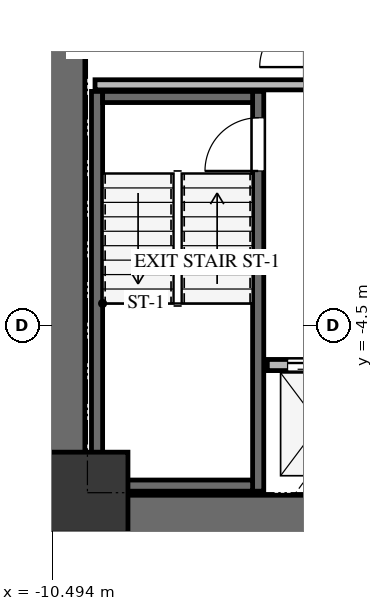
"""IFC4 building model, lengths in metres.
Left out: names, types, materials, properties, quantities, classifications, styles, units other than length and angle.
Written with IfcOpenShell. Run it as: python <this file> out.ifc"""

import sys

from ifc_helpers import new_model, si_unit, direction, frame, frame_2d, origin, origin_2d, place, context, subcontext, project, spatial, rectangle, extrude, source, transform, mapped, element, fill, save


model = new_model("IFC4")
c1 = context("Model", 3, precision=1e-05, world=origin(), true_north=direction((0.0, 1.0)))
c2 = subcontext(c1, "Body", "Model", "MODEL_VIEW")
j1 = project(units=[si_unit("LENGTHUNIT", "METRE"), si_unit("PLANEANGLEUNIT", "RADIAN")], contexts=[c1])
p1 = place(None, origin())
s1 = spatial("IfcSite", under=j1, at=p1, CompositionType="ELEMENT")
p2 = place(p1, origin())
s2 = spatial("IfcBuilding", under=s1, at=p2, CompositionType="ELEMENT")
p3 = place(p2, frame((0.0, 0.0, 32.4)))
s3 = spatial("IfcBuildingStorey", under=s2, at=p3, CompositionType="ELEMENT", Elevation=32.4)
p4 = place(p3, frame((-10.3, -8.75, 0.0), z_axis=(0.0, 0.0, 1.0), x_axis=(0.0, 1.0, 0.0)))
e1 = element("IfcWall", 1, at=p4, inside=s3, PredefinedType="SHEAR", context=c2, shape_type="SweptSolid", body=[
    extrude(rectangle(XDim=17.5, YDim=0.9, at=frame_2d((8.75, 0.0))), origin(), (0.0, 0.0, 1.0), 3.3),
])
p5 = place(p3, frame((-9.85, -8.3, 0.0), z_axis=(0.0, 0.0, 1.0), x_axis=(1.0, 0.0, 0.0)))
e2 = element("IfcWall", 2, at=p5, inside=s3, PredefinedType="SHEAR", context=c2, shape_type="SweptSolid", body=[
    extrude(rectangle(XDim=7.75, YDim=0.9, at=frame_2d((3.875, 0.0))), origin(), (0.0, 0.0, 1.0), 3.3),
])
p6 = place(p3, frame((-6.43, -7.77, -0.24), z_axis=(0.0, 0.0, 1.0), x_axis=(0.0, 1.0, 0.0)))
e3 = element("IfcWall", 3, at=p6, inside=s3, PredefinedType="SHEAR", context=c2, shape_type="SweptSolid", body=[
    extrude(rectangle(XDim=7.89, YDim=0.22, at=frame_2d((3.945, 0.0))), origin(), (0.0, 0.0, 1.0), 3.3),
])
p7 = place(p6, frame((6.32, 0.0, 0.0)))
e4 = element("IfcOpeningElement", 4, at=p7, cuts=e3, PredefinedType="OPENING", context=c2, shape_type="SweptSolid", body=[
    extrude(rectangle(XDim=1.05, YDim=2.15, at=frame_2d((0.525, 1.075))), frame((0.0, 0.12, 0.0), z_axis=(0.0, -1.0, 0.0), x_axis=(1.0, 0.0, 0.0)), (0.0, 0.0, 1.0), 0.24),
])
p8 = place(p3, frame((-9.61, 0.12, -0.24), z_axis=(0.0, 0.0, 1.0), x_axis=(0.0, -1.0, 0.0)))
e5 = element("IfcWall", 5, at=p8, inside=s3, PredefinedType="SHEAR", context=c2, shape_type="SweptSolid", body=[
    extrude(rectangle(XDim=7.89, YDim=0.22, at=frame_2d((3.945, 0.0))), origin(), (0.0, 0.0, 1.0), 3.3),
])
for number, where, z_axis, x_axis in (
    (6, (-9.5, -7.66, -0.24), (0.0, 0.0, 1.0), (1.0, 0.0, 0.0)),
    (7, (-6.54, 0.01, -0.24), (0.0, 0.0, 1.0), (-1.0, 0.0, 0.0)),
):
    element("IfcWall", number, at=place(p3, frame(where, z_axis=z_axis, x_axis=x_axis)), inside=s3, PredefinedType="SHEAR", context=c2, shape_type="SweptSolid", body=[
        extrude(rectangle(XDim=2.96, YDim=0.22, at=frame_2d((1.48, 0.0))), origin(), (0.0, 0.0, 1.0), 3.3),
    ])
m1 = source(origin(), c2, "Body", "SweptSolid", [
    extrude(rectangle(XDim=1.6, YDim=1.6, at=origin_2d()), origin(), (0.0, 0.0, 1.0), 3.3),
])
p9 = place(p3, frame((-9.8, -7.8, -0.24), z_axis=(0.0, 0.0, 1.0), x_axis=(1.0, 0.0, 0.0)))
e8 = element("IfcColumn", 8, at=p9, inside=s3, PredefinedType="COLUMN", context=c2, shape_type="MappedRepresentation", body=[
    mapped(m1, transform((0.0, 0.0, 0.0), x_axis=(1.0, 0.0, 0.0), y_axis=(0.0, 1.0, 0.0), z_axis=(0.0, 0.0, 1.0), scale=1.0)),
])
p10 = place(p3, frame((-9.65, 0.25, 0.0), z_axis=(0.0, 0.0, 1.0), x_axis=(1.0, 0.0, 0.0)))
e9 = element("IfcWall", 9, at=p10, inside=s3, PredefinedType="SOLIDWALL", context=c2, shape_type="SweptSolid", body=[
    extrude(rectangle(XDim=4.27, YDim=0.2, at=frame_2d((2.135, 0.0))), origin(), (0.0, 0.0, 1.0), 3.045),
])
p11 = place(p3, frame((-6.25, -5.28, 0.0), z_axis=(0.0, 0.0, 1.0), x_axis=(1.0, 0.0, 0.0)))
e10 = element("IfcWall", 10, at=p11, inside=s3, PredefinedType="SOLIDWALL", context=c2, shape_type="SweptSolid", body=[
    extrude(rectangle(XDim=3.9, YDim=0.22, at=frame_2d((1.95, 0.0))), origin(), (0.0, 0.0, 1.0), 3.045),
])
p12 = place(p11, frame((0.4, 0.0, 0.0)))
e11 = element("IfcOpeningElement", 11, at=p12, cuts=e10, PredefinedType="OPENING", context=c2, shape_type="SweptSolid", body=[
    extrude(rectangle(XDim=1.1, YDim=2.15, at=frame_2d((0.55, 1.075))), frame((0.0, 0.12, 0.0), z_axis=(0.0, -1.0, 0.0), x_axis=(1.0, 0.0, 0.0)), (0.0, 0.0, 1.0), 0.24),
])
p13 = place(p11, frame((2.25, 0.0, 0.0)))
e12 = element("IfcOpeningElement", 12, at=p13, cuts=e10, PredefinedType="OPENING", context=c2, shape_type="SweptSolid", body=[
    extrude(rectangle(XDim=1.1, YDim=2.15, at=frame_2d((0.55, 1.075))), frame((0.0, 0.12, 0.0), z_axis=(0.0, -1.0, 0.0), x_axis=(1.0, 0.0, 0.0)), (0.0, 0.0, 1.0), 0.24),
])
m2 = source(origin(), c2, "Body", "SweptSolid", [
    extrude(rectangle(XDim=1.05, YDim=2.15, at=frame_2d((0.525, 1.075))), frame((0.0, 0.025, 0.0), z_axis=(0.0, -1.0, 0.0), x_axis=(1.0, 0.0, 0.0)), (0.0, 0.0, 1.0), 0.05),
])
p14 = place(p7, origin())
e13 = element("IfcDoor", 13, at=p14, inside=s3, OperationType="SINGLE_SWING_LEFT", PredefinedType="DOOR", context=c2, shape_type="MappedRepresentation", body=[
    mapped(m2, transform((0.0, 0.0, 0.0), x_axis=(1.0, 0.0, 0.0), y_axis=(0.0, 1.0, 0.0), z_axis=(0.0, 0.0, 1.0), scale=1.0)),
])
fill(e4, e13)
m3 = source(origin(), c2, "Body", "SweptSolid", [
    extrude(rectangle(XDim=1.1, YDim=2.15, at=frame_2d((0.55, 1.075))), frame((0.0, 0.025, 0.0), z_axis=(0.0, -1.0, 0.0), x_axis=(1.0, 0.0, 0.0)), (0.0, 0.0, 1.0), 0.05),
])
p15 = place(p12, origin())
e14 = element("IfcDoor", 14, at=p15, inside=s3, OperationType="DOUBLE_DOOR_SLIDING", PredefinedType="DOOR", context=c2, shape_type="MappedRepresentation", body=[
    mapped(m3, transform((0.0, 0.0, 0.0), x_axis=(1.0, 0.0, 0.0), y_axis=(0.0, 1.0, 0.0), z_axis=(0.0, 0.0, 1.0), scale=1.0)),
])
fill(e11, e14)
save(model, sys.argv[1])
